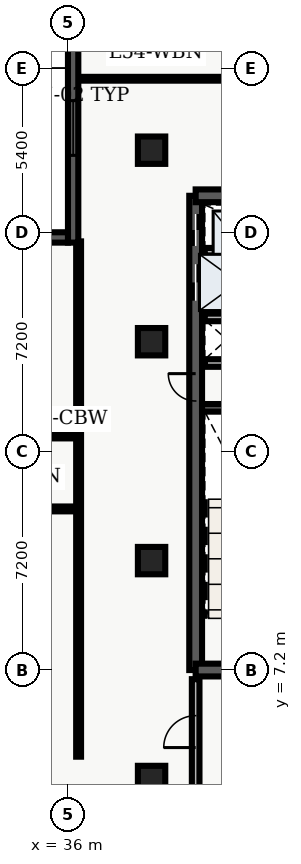
"""IFC4 building model, lengths in metres.
Left out: names, types, materials, properties, quantities, classifications, styles, units other than length and angle.
Written with IfcOpenShell. Run it as: python <this file> out.ifc"""

import sys

from ifc_helpers import new_model, entity, si_unit, converted_unit, direction, frame, origin_with_axes, origin_2d_with_axis, place, context, subcontext, project, spatial, polyline, rectangle, outline, extrude, element, fill, save


model = new_model("IFC4")
c1 = context("Model", 3, precision=1e-05, world=origin_with_axes(), true_north=direction((0.0, 1.0)))
c2 = subcontext(c1, "Body", "Model", "MODEL_VIEW")
j1 = project(units=[si_unit("LENGTHUNIT", "METRE"), converted_unit("PLANEANGLEUNIT", "DEGREE", entity("IfcPlaneAngleMeasure", 0.017), si_unit("PLANEANGLEUNIT", "RADIAN"), dimensions=[0, 0, 0, 0, 0, 0, 0])], contexts=[c1])
p1 = place(None, origin_with_axes())
s1 = spatial("IfcSite", under=j1, at=p1, CompositionType="ELEMENT")
p2 = place(p1, origin_with_axes())
s2 = spatial("IfcBuilding", under=s1, at=p2, CompositionType="ELEMENT")
p3 = place(p2, frame((0.0, 0.0, 219.9), z_axis=(0.0, 0.0, 1.0), x_axis=(1.0, 0.0, 0.0)))
s3 = spatial("IfcBuildingStorey", under=s2, at=p3, CompositionType="ELEMENT", Elevation=219.9)
p4 = place(p3, frame((40.2, 7.2, 0.0), z_axis=(0.0, 0.0, 1.0), x_axis=(0.0, 1.0, 0.0)))
e1 = element("IfcWall", 1, at=p4, inside=s3, PredefinedType="SHEAR", context=c2, shape_type="SweptSolid", body=[
    extrude(outline(polyline([(0.0, -0.21), (15.6, -0.21), (15.6, 0.21), (0.0, 0.21), (0.0, -0.21)])), origin_with_axes(), (0.0, 0.0, 1.0), 4.56),
])
p5 = place(p4, frame((14.475, 0.0, 0.0), z_axis=(0.0, 0.0, 1.0), x_axis=(1.0, 0.0, 0.0)))
e2 = element("IfcOpeningElement", 2, at=p5, cuts=e1, PredefinedType="OPENING", context=c2, shape_type="SweptSolid", body=[
    extrude(rectangle(XDim=1.05, YDim=0.44, at=origin_2d_with_axis()), origin_with_axes(), (0.0, 0.0, 1.0), 2.15),
])
p6 = place(p4, frame((12.75, 0.0, 0.0), z_axis=(0.0, 0.0, 1.0), x_axis=(1.0, 0.0, 0.0)))
e3 = element("IfcOpeningElement", 3, at=p6, cuts=e1, PredefinedType="OPENING", context=c2, shape_type="SweptSolid", body=[
    extrude(rectangle(XDim=1.2, YDim=0.44, at=origin_2d_with_axis()), origin_with_axes(), (0.0, 0.0, 1.0), 2.15),
])
p7 = place(p4, frame((9.3, 0.0, 0.0), z_axis=(0.0, 0.0, 1.0), x_axis=(1.0, 0.0, 0.0)))
e4 = element("IfcOpeningElement", 4, at=p7, cuts=e1, PredefinedType="OPENING", context=c2, shape_type="SweptSolid", body=[
    extrude(rectangle(XDim=0.9, YDim=0.44, at=origin_2d_with_axis()), origin_with_axes(), (0.0, 0.0, 1.0), 2.15),
])
p8 = place(p3, frame((40.2, 7.2, 0.0), z_axis=(0.0, 0.0, 1.0), x_axis=(1.0, 0.0, 0.0)))
e5 = element("IfcWall", 5, at=p8, inside=s3, PredefinedType="SHEAR", context=c2, shape_type="SweptSolid", body=[
    extrude(outline(polyline([(0.0, -0.21), (7.85, -0.21), (7.85, 0.21), (0.0, 0.21), (0.0, -0.21)])), origin_with_axes(), (0.0, 0.0, 1.0), 4.56),
])
p9 = place(p8, frame((2.175, 0.0, 0.0), z_axis=(0.0, 0.0, 1.0), x_axis=(1.0, 0.0, 0.0)))
e6 = element("IfcOpeningElement", 6, at=p9, cuts=e5, PredefinedType="OPENING", context=c2, shape_type="SweptSolid", body=[
    extrude(rectangle(XDim=1.05, YDim=0.44, at=origin_2d_with_axis()), origin_with_axes(), (0.0, 0.0, 1.0), 2.15),
])
p10 = place(p3, frame((40.2, 22.8, 0.0), z_axis=(0.0, 0.0, 1.0), x_axis=(1.0, 0.0, 0.0)))
e7 = element("IfcWall", 7, at=p10, inside=s3, PredefinedType="SHEAR", context=c2, shape_type="SweptSolid", body=[
    extrude(outline(polyline([(0.0, -0.21), (7.85, -0.21), (7.85, 0.21), (0.0, 0.21), (0.0, -0.21)])), origin_with_axes(), (0.0, 0.0, 1.0), 4.56),
])
p11 = place(p10, frame((5.775, 0.0, 0.0), z_axis=(0.0, 0.0, 1.0), x_axis=(1.0, 0.0, 0.0)))
e8 = element("IfcOpeningElement", 8, at=p11, cuts=e7, PredefinedType="OPENING", context=c2, shape_type="SweptSolid", body=[
    extrude(rectangle(XDim=1.05, YDim=0.44, at=origin_2d_with_axis()), origin_with_axes(), (0.0, 0.0, 1.0), 2.15),
])
p12 = place(p3, frame((40.41, 15.825, 0.0), z_axis=(0.0, 0.0, 1.0), x_axis=(1.0, 0.0, 0.0)))
e9 = element("IfcWall", 9, at=p12, inside=s3, PredefinedType="SHEAR", context=c2, shape_type="SweptSolid", body=[
    extrude(outline(polyline([(0.0, -0.125), (3.59, -0.125), (3.59, 0.125), (0.0, 0.125), (0.0, -0.125)])), origin_with_axes(), (0.0, 0.0, 1.0), 4.56),
])
p13 = place(p3, frame((40.5, 17.3, 0.0), z_axis=(0.0, 0.0, 1.0), x_axis=(1.0, 0.0, 0.0)))
e10 = element("IfcWall", 10, at=p13, inside=s3, PredefinedType="SOLIDWALL", context=c2, shape_type="SweptSolid", body=[
    extrude(outline(polyline([(0.0, -0.125), (3.5, -0.125), (3.5, 0.125), (0.0, 0.125), (0.0, -0.125)])), origin_with_axes(), (0.0, 0.0, 1.0), 3.6),
])
p14 = place(p13, frame((2.4, 0.0, 0.0), z_axis=(0.0, 0.0, 1.0), x_axis=(1.0, 0.0, 0.0)))
e11 = element("IfcOpeningElement", 11, at=p14, cuts=e10, PredefinedType="OPENING", context=c2, shape_type="SweptSolid", body=[
    extrude(rectangle(XDim=0.9, YDim=0.27, at=origin_2d_with_axis()), origin_with_axes(), (0.0, 0.0, 1.0), 2.15),
])
p15 = place(p3, frame((40.5, 18.8, 0.0), z_axis=(0.0, 0.0, 1.0), x_axis=(1.0, 0.0, 0.0)))
e12 = element("IfcWall", 12, at=p15, inside=s3, PredefinedType="SOLIDWALL", context=c2, shape_type="SweptSolid", body=[
    extrude(outline(polyline([(0.0, -0.125), (3.5, -0.125), (3.5, 0.125), (0.0, 0.125), (0.0, -0.125)])), origin_with_axes(), (0.0, 0.0, 1.0), 3.6),
])
p16 = place(p3, frame((40.2, 3.1, 0.0), z_axis=(0.0, 0.0, 1.0), x_axis=(0.0, 1.0, 0.0)))
e13 = element("IfcWall", 13, at=p16, inside=s3, PredefinedType="SOLIDWALL", context=c2, shape_type="SweptSolid", body=[
    extrude(outline(polyline([(0.0, -0.125), (3.8, -0.125), (3.8, 0.125), (0.0, 0.125), (0.0, -0.125)])), origin_with_axes(), (0.0, 0.0, 1.0), 3.6),
])
p17 = place(p16, frame((2.075, 0.0, 0.0), z_axis=(0.0, 0.0, 1.0), x_axis=(1.0, 0.0, 0.0)))
e14 = element("IfcOpeningElement", 14, at=p17, cuts=e13, PredefinedType="OPENING", context=c2, shape_type="SweptSolid", body=[
    extrude(rectangle(XDim=1.05, YDim=0.27, at=origin_2d_with_axis()), origin_with_axes(), (0.0, 0.0, 1.0), 2.15),
])
for number, where, z_axis, x_axis in (
    (15, (38.75, 3.6, 0.0), (0.0, 0.0, 1.0), (1.0, 0.0, 0.0)),
    (16, (38.75, 10.8, 0.0), (0.0, 0.0, 1.0), (1.0, 0.0, 0.0)),
    (17, (38.75, 18.0, 0.0), (0.0, 0.0, 1.0), (1.0, 0.0, 0.0)),
    (18, (38.75, 24.3, 0.0), (0.0, 0.0, 1.0), (1.0, 0.0, 0.0)),
):
    element("IfcColumn", number, at=place(p3, frame(where, z_axis=z_axis, x_axis=x_axis)), inside=s3, PredefinedType="COLUMN", context=c2, shape_type="SweptSolid", body=[
        extrude(rectangle(XDim=0.9, YDim=0.9, at=origin_2d_with_axis()), origin_with_axes(), (0.0, 0.0, 1.0), 4.8),
    ])
p18 = place(p3, frame((40.5, 20.96, 0.0), z_axis=(0.0, 0.0, 1.0), x_axis=(1.0, 0.0, 0.0)))
e19 = element("IfcWall", 19, at=p18, inside=s3, PredefinedType="SOLIDWALL", context=c2, shape_type="SweptSolid", body=[
    extrude(outline(polyline([(0.0, -0.125), (3.5, -0.125), (3.5, 0.125), (0.0, 0.125), (0.0, -0.125)])), origin_with_axes(), (0.0, 0.0, 1.0), 3.2),
])
p19 = place(p3, frame((21.15, 12.5, 0.0), z_axis=(0.0, 0.0, 1.0), x_axis=(1.0, 0.0, 0.0)))
e20 = element("IfcWall", 20, at=p19, inside=s3, PredefinedType="PARTITIONING", context=c2, shape_type="SweptSolid", body=[
    extrude(outline(polyline([(0.0, -0.08), (15.2, -0.08), (15.2, 0.08), (0.0, 0.08), (0.0, -0.08)])), origin_with_axes(), (0.0, 0.0, 1.0), 3.2),
])
p20 = place(p19, frame((7.65, 0.0, 0.0), z_axis=(0.0, 0.0, 1.0), x_axis=(1.0, 0.0, 0.0)))
e21 = element("IfcOpeningElement", 21, at=p20, cuts=e20, PredefinedType="OPENING", context=c2, shape_type="SweptSolid", body=[
    extrude(rectangle(XDim=1.0, YDim=0.18, at=origin_2d_with_axis()), origin_with_axes(), (0.0, 0.0, 1.0), 2.15),
])
p21 = place(p3, frame((21.15, 14.9, 0.0), z_axis=(0.0, 0.0, 1.0), x_axis=(1.0, 0.0, 0.0)))
e22 = element("IfcWall", 22, at=p21, inside=s3, PredefinedType="PARTITIONING", context=c2, shape_type="SweptSolid", body=[
    extrude(outline(polyline([(0.0, -0.08), (15.2, -0.08), (15.2, 0.08), (0.0, 0.08), (0.0, -0.08)])), origin_with_axes(), (0.0, 0.0, 1.0), 3.2),
])
p22 = place(p21, frame((3.583, 0.0, 0.0), z_axis=(0.0, 0.0, 1.0), x_axis=(1.0, 0.0, 0.0)))
e23 = element("IfcOpeningElement", 23, at=p22, cuts=e22, PredefinedType="OPENING", context=c2, shape_type="SweptSolid", body=[
    extrude(rectangle(XDim=1.0, YDim=0.18, at=origin_2d_with_axis()), origin_with_axes(), (0.0, 0.0, 1.0), 2.15),
])
p23 = place(p21, frame((11.053, 0.0, 0.0), z_axis=(0.0, 0.0, 1.0), x_axis=(1.0, 0.0, 0.0)))
e24 = element("IfcOpeningElement", 24, at=p23, cuts=e22, PredefinedType="OPENING", context=c2, shape_type="SweptSolid", body=[
    extrude(rectangle(XDim=1.0, YDim=0.18, at=origin_2d_with_axis()), origin_with_axes(), (0.0, 0.0, 1.0), 2.15),
])
p24 = place(p3, frame((36.35, 4.35, 0.0), z_axis=(0.0, 0.0, 1.0), x_axis=(0.0, 1.0, 0.0)))
e25 = element("IfcWall", 25, at=p24, inside=s3, PredefinedType="PARTITIONING", context=c2, shape_type="SweptSolid", body=[
    extrude(outline(polyline([(0.0, -0.08), (16.95, -0.08), (16.95, 0.08), (0.0, 0.08), (0.0, -0.08)])), origin_with_axes(), (0.0, 0.0, 1.0), 3.2),
])
p25 = place(p3, frame((36.335, 26.65, 0.0), z_axis=(0.0, 0.0, 1.0), x_axis=(1.0, 0.0, 0.0)))
e26 = element("IfcWall", 26, at=p25, inside=s3, PredefinedType="PARTITIONING", context=c2, shape_type="SweptSolid", body=[
    extrude(outline(polyline([(0.0, -0.062), (11.195, -0.062), (11.195, 0.062), (0.0, 0.062), (0.0, -0.062)])), origin_with_axes(), (0.0, 0.0, 1.0), 3.2),
])
p26 = place(p25, frame((6.665, 0.0, 0.0), z_axis=(0.0, 0.0, 1.0), x_axis=(1.0, 0.0, 0.0)))
e27 = element("IfcOpeningElement", 27, at=p26, cuts=e26, PredefinedType="OPENING", context=c2, shape_type="SweptSolid", body=[
    extrude(rectangle(XDim=1.0, YDim=0.145, at=origin_2d_with_axis()), origin_with_axes(), (0.0, 0.0, 1.0), 2.15),
])
p27 = place(p3, frame((36.17, 21.26, 0.0), z_axis=(0.0, 0.0, 1.0), x_axis=(0.0, 1.0, 0.0)))
e28 = element("IfcWall", 28, at=p27, inside=s3, PredefinedType="SOLIDWALL", context=c2, shape_type="SweptSolid", body=[
    extrude(outline(polyline([(0.0, -0.17), (7.54, -0.17), (7.54, 0.17), (0.0, 0.17), (0.0, -0.17)])), origin_with_axes(), (0.0, 0.0, 1.0), 4.56),
])
p28 = place(p27, frame((3.77, 0.0, 0.45), z_axis=(0.0, 0.0, 1.0), x_axis=(1.0, 0.0, 0.0)))
e29 = element("IfcOpeningElement", 29, at=p28, cuts=e28, PredefinedType="OPENING", context=c2, shape_type="SweptSolid", body=[
    extrude(rectangle(XDim=1.8, YDim=0.36, at=origin_2d_with_axis()), origin_with_axes(), (0.0, 0.0, 1.0), 2.1),
])
p29 = place(p3, frame((32.06, 21.43, 0.0), z_axis=(0.0, 0.0, 1.0), x_axis=(1.0, 0.0, 0.0)))
e30 = element("IfcWall", 30, at=p29, inside=s3, PredefinedType="SOLIDWALL", context=c2, shape_type="SweptSolid", body=[
    extrude(outline(polyline([(0.0, -0.17), (3.94, -0.17), (3.94, 0.17), (0.0, 0.17), (0.0, -0.17)])), origin_with_axes(), (0.0, 0.0, 1.0), 4.56),
])
p30 = place(p4, frame((14.475, 0.0, 0.0), z_axis=(0.0, 0.0, 1.0), x_axis=(1.0, 0.0, 0.0)))
e31 = element("IfcDoor", 31, at=p30, inside=s3, OperationType="SLIDING_TO_RIGHT", PredefinedType="DOOR", context=c2, shape_type="SweptSolid", body=[
    extrude(rectangle(XDim=1.05, YDim=0.09, at=origin_2d_with_axis()), origin_with_axes(), (0.0, 0.0, 1.0), 2.15),
])
fill(e2, e31)
p31 = place(p4, frame((12.75, 0.0, 0.0), z_axis=(0.0, 0.0, 1.0), x_axis=(1.0, 0.0, 0.0)))
e32 = element("IfcDoor", 32, at=p31, inside=s3, OperationType="DOUBLE_DOOR_SLIDING", PredefinedType="DOOR", context=c2, shape_type="SweptSolid", body=[
    extrude(rectangle(XDim=1.2, YDim=0.09, at=origin_2d_with_axis()), origin_with_axes(), (0.0, 0.0, 1.0), 2.15),
])
fill(e3, e32)
p32 = place(p4, frame((9.3, 0.0, 0.0), z_axis=(0.0, 0.0, 1.0), x_axis=(1.0, 0.0, 0.0)))
e33 = element("IfcDoor", 33, at=p32, inside=s3, OperationType="SINGLE_SWING_RIGHT", PredefinedType="DOOR", context=c2, shape_type="SweptSolid", body=[
    extrude(rectangle(XDim=0.9, YDim=0.09, at=origin_2d_with_axis()), origin_with_axes(), (0.0, 0.0, 1.0), 2.15),
])
fill(e4, e33)
p33 = place(p16, frame((2.075, 0.0, 0.0), z_axis=(0.0, 0.0, 1.0), x_axis=(1.0, 0.0, 0.0)))
e34 = element("IfcDoor", 34, at=p33, inside=s3, OperationType="SINGLE_SWING_LEFT", PredefinedType="DOOR", context=c2, shape_type="SweptSolid", body=[
    extrude(rectangle(XDim=1.05, YDim=0.09, at=origin_2d_with_axis()), origin_with_axes(), (0.0, 0.0, 1.0), 2.15),
])
fill(e14, e34)
p34 = place(p27, frame((3.77, 0.0, 0.45), z_axis=(0.0, 0.0, 1.0), x_axis=(1.0, 0.0, 0.0)))
e35 = element("IfcWindow", 35, at=p34, inside=s3, PredefinedType="WINDOW", context=c2, shape_type="SweptSolid", body=[
    extrude(rectangle(XDim=1.8, YDim=0.09, at=origin_2d_with_axis()), origin_with_axes(), (0.0, 0.0, 1.0), 2.1),
])
fill(e29, e35)
save(model, sys.argv[1])
